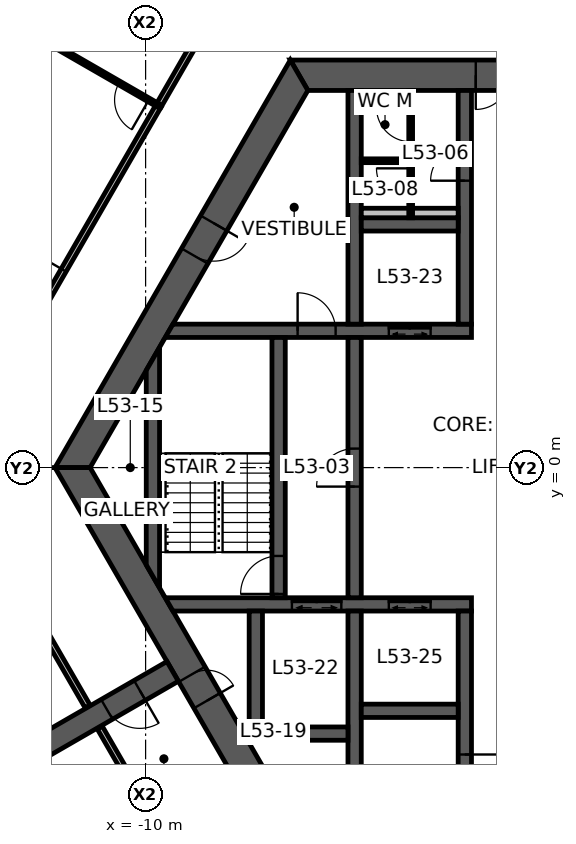
"""IFC4 building model, lengths in metres.
Left out: names, types, materials, properties, quantities, classifications, styles, units other than length and angle.
Written with IfcOpenShell. Run it as: python <this file> out.ifc"""

import sys

from ifc_helpers import new_model, si_unit, direction, frame, frame_2d, origin, place, context, subcontext, project, spatial, polyline, rectangle, outline, extrude, element, fill, save


model = new_model("IFC4")
c1 = context("Model", 3, precision=1e-05, world=origin(), true_north=direction((0.0, 1.0)))
c2 = subcontext(c1, "Body", "Model", "MODEL_VIEW")
j1 = project(units=[si_unit("LENGTHUNIT", "METRE"), si_unit("PLANEANGLEUNIT", "RADIAN")], contexts=[c1])
p1 = place(None, origin())
s1 = spatial("IfcSite", under=j1, at=p1, CompositionType="ELEMENT")
p2 = place(p1, origin())
s2 = spatial("IfcBuilding", under=s1, at=p2, CompositionType="ELEMENT")
p3 = place(p2, frame((0.0, 0.0, 212.8)))
s3 = spatial("IfcBuildingStorey", under=s2, at=p3, CompositionType="ELEMENT", Elevation=212.8)
p4 = place(p3, frame((5.961, 10.325, 0.0), z_axis=(0.0, 0.0, 1.0), x_axis=(-1.0, 0.0, 0.0)))
e1 = element("IfcWall", 1, at=p4, inside=s3, PredefinedType="SHEAR", context=c2, shape_type="SweptSolid", body=[
    extrude(outline(polyline([(-0.231, -0.4), (4.649, -0.4), (5.549, -0.4), (6.374, -0.4), (7.273, -0.4), (12.153, -0.4), (11.691, 0.4), (7.273, 0.4), (6.374, 0.4), (5.549, 0.4), (4.649, 0.4), (0.231, 0.4), (-0.231, -0.4)])), origin(), (0.0, 0.0, 1.0), 3.9),
])
p5 = place(p4, frame((6.374, 0.0, 0.0)))
e2 = element("IfcOpeningElement", 2, at=p5, cuts=e1, PredefinedType="OPENING", context=c2, shape_type="SweptSolid", body=[
    extrude(rectangle(XDim=0.9, YDim=2.1, at=frame_2d((0.45, 1.05))), frame((0.0, 0.41, 0.0), z_axis=(0.0, -1.0, 0.0), x_axis=(1.0, 0.0, 0.0)), (0.0, 0.0, 1.0), 0.82),
])
p6 = place(p4, frame((4.649, 0.0, 0.0)))
e3 = element("IfcOpeningElement", 3, at=p6, cuts=e1, PredefinedType="OPENING", context=c2, shape_type="SweptSolid", body=[
    extrude(rectangle(XDim=0.9, YDim=2.1, at=frame_2d((0.45, 1.05))), frame((0.0, 0.41, 0.0), z_axis=(0.0, -1.0, 0.0), x_axis=(1.0, 0.0, 0.0)), (0.0, 0.0, 1.0), 0.82),
])
p7 = place(p3, frame((-5.961, 10.325, 0.0), z_axis=(0.0, 0.0, 1.0), x_axis=(-0.500004296715, -0.866022923061, 0.0)))
e4 = element("IfcWall", 4, at=p7, inside=s3, PredefinedType="SHEAR", context=c2, shape_type="SweptSolid", body=[
    extrude(outline(polyline([(-0.231, -0.4), (4.494, -0.4), (5.494, -0.4), (12.153, -0.4), (11.691, 0.4), (5.494, 0.4), (4.494, 0.4), (0.231, 0.4), (-0.231, -0.4)])), origin(), (0.0, 0.0, 1.0), 3.9),
])
p8 = place(p7, frame((4.494, 0.0, 0.0)))
e5 = element("IfcOpeningElement", 5, at=p8, cuts=e4, PredefinedType="OPENING", context=c2, shape_type="SweptSolid", body=[
    extrude(rectangle(XDim=1.0, YDim=2.1, at=frame_2d((0.5, 1.05))), frame((0.0, 0.41, 0.0), z_axis=(0.0, -1.0, 0.0), x_axis=(1.0, 0.0, 0.0)), (0.0, 0.0, 1.0), 0.82),
])
p9 = place(p3, frame((-11.922, 0.0, 0.0), z_axis=(0.0, 0.0, 1.0), x_axis=(0.500004296715, -0.866022923061, 0.0)))
e6 = element("IfcWall", 6, at=p9, inside=s3, PredefinedType="SHEAR", context=c2, shape_type="SweptSolid", body=[
    extrude(outline(polyline([(-0.231, -0.4), (6.281, -0.4), (7.081, -0.4), (12.153, -0.4), (11.691, 0.4), (7.081, 0.4), (6.281, 0.4), (0.231, 0.4), (-0.231, -0.4)])), origin(), (0.0, 0.0, 1.0), 3.9),
])
p10 = place(p9, frame((6.281, 0.0, 0.0)))
e7 = element("IfcOpeningElement", 7, at=p10, cuts=e6, PredefinedType="OPENING", context=c2, shape_type="SweptSolid", body=[
    extrude(rectangle(XDim=0.8, YDim=2.1, at=frame_2d((0.4, 1.05))), frame((0.0, 0.41, 0.0), z_axis=(0.0, -1.0, 0.0), x_axis=(1.0, 0.0, 0.0)), (0.0, 0.0, 1.0), 0.82),
])
p11 = place(p3, frame((-9.288, -5.363, 0.0), z_axis=(0.0, 0.0, 1.0), x_axis=(-0.866027473358, -0.499996415376, 0.0)))
e8 = element("IfcWall", 8, at=p11, inside=s3, PredefinedType="SHEAR", context=c2, shape_type="SweptSolid", body=[
    extrude(rectangle(XDim=7.045, YDim=0.6, at=frame_2d((3.523, 0.0))), origin(), (0.0, 0.0, 1.0), 3.9),
])
p12 = place(p11, frame((1.0, 0.0, 0.0)))
e9 = element("IfcOpeningElement", 9, at=p12, cuts=e8, PredefinedType="OPENING", context=c2, shape_type="SweptSolid", body=[
    extrude(rectangle(XDim=1.0, YDim=2.1, at=frame_2d((0.5, 1.05))), frame((0.0, 0.31, 0.0), z_axis=(0.0, -1.0, 0.0), x_axis=(1.0, 0.0, 0.0)), (0.0, 0.0, 1.0), 0.62),
])
p13 = place(p3, frame((-9.382, 3.6, 0.0), z_axis=(0.0, 0.0, 1.0), x_axis=(1.0, 0.0, 0.0)))
e10 = element("IfcWall", 10, at=p13, inside=s3, PredefinedType="SHEAR", context=c2, shape_type="SweptSolid", body=[
    extrude(outline(polyline([(-0.101, -0.175), (3.382, -0.175), (4.382, -0.175), (5.782, -0.175), (6.882, -0.175), (7.957, -0.175), (7.957, 0.175), (6.882, 0.175), (5.782, 0.175), (4.382, 0.175), (3.382, 0.175), (0.101, 0.175), (-0.101, -0.175)])), origin(), (0.0, 0.0, 1.0), 3.9),
])
p14 = place(p13, frame((3.382, 0.0, 0.0)))
e11 = element("IfcOpeningElement", 11, at=p14, cuts=e10, PredefinedType="OPENING", context=c2, shape_type="SweptSolid", body=[
    extrude(rectangle(XDim=1.0, YDim=2.1, at=frame_2d((0.5, 1.05))), frame((0.0, 0.185, 0.0), z_axis=(0.0, -1.0, 0.0), x_axis=(1.0, 0.0, 0.0)), (0.0, 0.0, 1.0), 0.37),
])
p15 = place(p13, frame((5.782, 0.0, 0.0)))
e12 = element("IfcOpeningElement", 12, at=p15, cuts=e10, PredefinedType="OPENING", context=c2, shape_type="SweptSolid", body=[
    extrude(rectangle(XDim=1.1, YDim=2.1, at=frame_2d((0.55, 1.05))), frame((0.0, 0.185, 0.0), z_axis=(0.0, -1.0, 0.0), x_axis=(1.0, 0.0, 0.0)), (0.0, 0.0, 1.0), 0.37),
])
p16 = place(p3, frame((-9.382, -3.6, 0.0), z_axis=(0.0, 0.0, 1.0), x_axis=(1.0, 0.0, 0.0)))
e13 = element("IfcWall", 13, at=p16, inside=s3, PredefinedType="SHEAR", context=c2, shape_type="SweptSolid", body=[
    extrude(outline(polyline([(0.101, -0.175), (3.232, -0.175), (4.532, -0.175), (5.782, -0.175), (6.882, -0.175), (7.957, -0.175), (7.957, 0.175), (6.882, 0.175), (5.782, 0.175), (4.532, 0.175), (3.232, 0.175), (-0.101, 0.175), (0.101, -0.175)])), origin(), (0.0, 0.0, 1.0), 3.9),
])
p17 = place(p16, frame((5.782, 0.0, 0.0)))
e14 = element("IfcOpeningElement", 14, at=p17, cuts=e13, PredefinedType="OPENING", context=c2, shape_type="SweptSolid", body=[
    extrude(rectangle(XDim=1.1, YDim=2.1, at=frame_2d((0.55, 1.05))), frame((0.0, 0.185, 0.0), z_axis=(0.0, -1.0, 0.0), x_axis=(1.0, 0.0, 0.0)), (0.0, 0.0, 1.0), 0.37),
])
p18 = place(p16, frame((3.232, 0.0, 0.0)))
e15 = element("IfcOpeningElement", 15, at=p18, cuts=e13, PredefinedType="OPENING", context=c2, shape_type="SweptSolid", body=[
    extrude(rectangle(XDim=1.3, YDim=2.1, at=frame_2d((0.65, 1.05))), frame((0.0, 0.185, 0.0), z_axis=(0.0, -1.0, 0.0), x_axis=(1.0, 0.0, 0.0)), (0.0, 0.0, 1.0), 0.37),
])
p19 = place(p3, frame((-1.6, 3.775, 0.0), z_axis=(0.0, 0.0, 1.0), x_axis=(0.0, 1.0, 0.0)))
e16 = element("IfcWall", 16, at=p19, inside=s3, PredefinedType="SHEAR", context=c2, shape_type="SweptSolid", body=[
    extrude(rectangle(XDim=6.15, YDim=0.35, at=frame_2d((3.075, 0.0))), origin(), (0.0, 0.0, 1.0), 3.9),
])
p20 = place(p19, frame((3.775, 0.0, 0.0)))
e17 = element("IfcOpeningElement", 17, at=p20, cuts=e16, PredefinedType="OPENING", context=c2, shape_type="SweptSolid", body=[
    extrude(rectangle(XDim=0.9, YDim=2.1, at=frame_2d((0.45, 1.05))), frame((0.0, 0.185, 0.0), z_axis=(0.0, -1.0, 0.0), x_axis=(1.0, 0.0, 0.0)), (0.0, 0.0, 1.0), 0.37),
])
p21 = place(p3, frame((-1.6, -3.775, 0.0), z_axis=(0.0, 0.0, 1.0), x_axis=(0.0, -1.0, 0.0)))
e18 = element("IfcWall", 18, at=p21, inside=s3, PredefinedType="SHEAR", context=c2, shape_type="SweptSolid", body=[
    extrude(rectangle(XDim=6.15, YDim=0.35, at=frame_2d((3.075, 0.0))), origin(), (0.0, 0.0, 1.0), 3.9),
])
p22 = place(p21, frame((3.775, 0.0, 0.0)))
e19 = element("IfcOpeningElement", 19, at=p22, cuts=e18, PredefinedType="OPENING", context=c2, shape_type="SweptSolid", body=[
    extrude(rectangle(XDim=0.9, YDim=2.1, at=frame_2d((0.45, 1.05))), frame((0.0, 0.185, 0.0), z_axis=(0.0, -1.0, 0.0), x_axis=(1.0, 0.0, 0.0)), (0.0, 0.0, 1.0), 0.37),
])
p23 = place(p3, frame((-4.5, -3.425, 0.0), z_axis=(0.0, 0.0, 1.0), x_axis=(0.0, 1.0, 0.0)))
e20 = element("IfcWall", 20, at=p23, inside=s3, PredefinedType="SHEAR", context=c2, shape_type="SweptSolid", body=[
    extrude(rectangle(XDim=6.85, YDim=0.35, at=frame_2d((3.425, 0.0))), origin(), (0.0, 0.0, 1.0), 3.9),
])
p24 = place(p23, frame((2.925, 0.0, 0.0)))
e21 = element("IfcOpeningElement", 21, at=p24, cuts=e20, PredefinedType="OPENING", context=c2, shape_type="SweptSolid", body=[
    extrude(rectangle(XDim=1.0, YDim=2.1, at=frame_2d((0.5, 1.05))), frame((0.0, 0.185, 0.0), z_axis=(0.0, -1.0, 0.0), x_axis=(1.0, 0.0, 0.0)), (0.0, 0.0, 1.0), 0.37),
])
p25 = place(p3, frame((-6.5, -3.425, 0.0), z_axis=(0.0, 0.0, 1.0), x_axis=(0.0, 1.0, 0.0)))
e22 = element("IfcWall", 22, at=p25, inside=s3, PredefinedType="SHEAR", context=c2, shape_type="SweptSolid", body=[
    extrude(rectangle(XDim=6.85, YDim=0.35, at=frame_2d((3.425, 0.0))), origin(), (0.0, 0.0, 1.0), 3.9),
])
p26 = place(p25, frame((0.1, 0.0, 0.0)))
e23 = element("IfcOpeningElement", 23, at=p26, cuts=e22, PredefinedType="OPENING", context=c2, shape_type="SweptSolid", body=[
    extrude(rectangle(XDim=1.0, YDim=2.1, at=frame_2d((0.5, 1.05))), frame((0.0, 0.185, 0.0), z_axis=(0.0, -1.0, 0.0), x_axis=(1.0, 0.0, 0.0)), (0.0, 0.0, 1.0), 0.37),
])
for number, where, z_axis, x_axis in (
    (24, (-4.5, 3.775, 0.0), (0.0, 0.0, 1.0), (0.0, 1.0, 0.0)),
    (25, (-4.5, -3.775, 0.0), (0.0, 0.0, 1.0), (0.0, -1.0, 0.0)),
):
    element("IfcWall", number, at=place(p3, frame(where, z_axis=z_axis, x_axis=x_axis)), inside=s3, PredefinedType="SHEAR", context=c2, shape_type="SweptSolid", body=[
        extrude(rectangle(XDim=6.15, YDim=0.35, at=frame_2d((3.075, 0.0))), origin(), (0.0, 0.0, 1.0), 3.9),
    ])
for number, where, z_axis, x_axis in (
    (26, (-4.325, 6.4, 0.0), (0.0, 0.0, 1.0), (1.0, 0.0, 0.0)),
    (27, (-4.325, -6.4, 0.0), (0.0, 0.0, 1.0), (1.0, 0.0, 0.0)),
):
    element("IfcWall", number, at=place(p3, frame(where, z_axis=z_axis, x_axis=x_axis)), inside=s3, PredefinedType="SHEAR", context=c2, shape_type="SweptSolid", body=[
        extrude(rectangle(XDim=2.55, YDim=0.35, at=frame_2d((1.275, 0.0))), origin(), (0.0, 0.0, 1.0), 3.9),
    ])
p27 = place(p3, frame((-7.275, -7.0, 0.0), z_axis=(0.0, 0.0, 1.0), x_axis=(1.0, 0.0, 0.0)))
e28 = element("IfcWall", 28, at=p27, inside=s3, PredefinedType="SHEAR", context=c2, shape_type="SweptSolid", body=[
    extrude(rectangle(XDim=2.6, YDim=0.35, at=frame_2d((1.3, 0.0))), origin(), (0.0, 0.0, 1.0), 3.9),
])
p28 = place(p3, frame((-7.1, -3.775, 0.0), z_axis=(0.0, 0.0, 1.0), x_axis=(0.0, -1.0, 0.0)))
e29 = element("IfcWall", 29, at=p28, inside=s3, PredefinedType="SHEAR", context=c2, shape_type="SweptSolid", body=[
    extrude(rectangle(XDim=3.05, YDim=0.35, at=frame_2d((1.525, 0.0))), origin(), (0.0, 0.0, 1.0), 3.9),
])
p29 = place(p3, frame((-9.808, -2.862, 0.0), z_axis=(0.0, 0.0, 1.0), x_axis=(0.0, 1.0, 0.0)))
e30 = element("IfcWall", 30, at=p29, inside=s3, PredefinedType="SHEAR", context=c2, shape_type="SweptSolid", body=[
    extrude(outline(polyline([(-0.303, -0.175), (6.028, -0.175), (5.421, 0.175), (0.303, 0.175), (-0.303, -0.175)])), origin(), (0.0, 0.0, 1.0), 3.9),
])
p30 = place(p3, frame((-4.325, 6.7, 0.0), z_axis=(0.0, 0.0, 1.0), x_axis=(1.0, 0.0, 0.0)))
e31 = element("IfcWall", 31, at=p30, inside=s3, PredefinedType="PLUMBINGWALL", context=c2, shape_type="SweptSolid", body=[
    extrude(rectangle(XDim=2.55, YDim=0.25, at=frame_2d((1.275, 0.0))), origin(), (0.0, 0.0, 1.0), 3.9),
])
p31 = place(p3, frame((-3.025, 6.575, 0.0), z_axis=(0.0, 0.0, 1.0), x_axis=(0.0, 1.0, 0.0)))
e32 = element("IfcWall", 32, at=p31, inside=s3, PredefinedType="PARTITIONING", context=c2, shape_type="SweptSolid", body=[
    extrude(rectangle(XDim=3.35, YDim=0.1, at=frame_2d((1.675, 0.0))), origin(), (0.0, 0.0, 1.0), 2.95),
])
p32 = place(p31, frame((2.0, 0.0, 0.0)))
e33 = element("IfcOpeningElement", 33, at=p32, cuts=e32, PredefinedType="OPENING", context=c2, shape_type="SweptSolid", body=[
    extrude(rectangle(XDim=0.9, YDim=2.1, at=frame_2d((0.45, 1.05))), frame((0.0, 0.06, 0.0), z_axis=(0.0, -1.0, 0.0), x_axis=(1.0, 0.0, 0.0)), (0.0, 0.0, 1.0), 0.12),
])
p33 = place(p31, frame((0.4, 0.0, 0.0)))
e34 = element("IfcOpeningElement", 34, at=p33, cuts=e32, PredefinedType="OPENING", context=c2, shape_type="SweptSolid", body=[
    extrude(rectangle(XDim=0.9, YDim=2.1, at=frame_2d((0.45, 1.05))), frame((0.0, 0.06, 0.0), z_axis=(0.0, -1.0, 0.0), x_axis=(1.0, 0.0, 0.0)), (0.0, 0.0, 1.0), 0.12),
])
p34 = place(p3, frame((-3.075, 8.075, 0.0), z_axis=(0.0, 0.0, 1.0), x_axis=(-1.0, 0.0, 0.0)))
e35 = element("IfcWall", 35, at=p34, inside=s3, PredefinedType="PARTITIONING", context=c2, shape_type="SweptSolid", body=[
    extrude(rectangle(XDim=1.25, YDim=0.1, at=frame_2d((0.625, 0.0))), origin(), (0.0, 0.0, 1.0), 2.95),
])
p35 = place(p3, frame((-9.661, 9.516, 0.0), z_axis=(0.0, 0.0, 1.0), x_axis=(0.499997836828, 0.866026652689, 0.0)))
e36 = element("IfcWall", 36, at=p35, inside=s3, PredefinedType="PARTITIONING", context=c2, shape_type="SweptSolid", body=[
    extrude(rectangle(XDim=4.144, YDim=0.15, at=frame_2d((2.072, 0.0))), origin(), (0.0, 0.0, 1.0), 2.95),
])
p36 = place(p3, frame((-11.527, -6.285, 0.0), z_axis=(0.0, 0.0, 1.0), x_axis=(-0.500003537243, 0.866023361547, 0.0)))
e37 = element("IfcWall", 37, at=p36, inside=s3, PredefinedType="PARTITIONING", context=c2, shape_type="SweptSolid", body=[
    extrude(rectangle(XDim=6.516, YDim=0.15, at=frame_2d((3.258, 0.0))), origin(), (0.0, 0.0, 1.0), 2.95),
])
p37 = place(p3, frame((-15.156, 0.0, 0.0), z_axis=(0.0, 0.0, 1.0), x_axis=(0.500006847747, 0.8660214502, 0.0)))
e38 = element("IfcWall", 38, at=p37, inside=s3, PredefinedType="PARTITIONING", context=c2, shape_type="SweptSolid", body=[
    extrude(rectangle(XDim=10.998, YDim=0.15, at=frame_2d((5.499, 0.0))), origin(), (0.0, 0.0, 1.0), 2.95),
])
p38 = place(p37, frame((4.999, 0.0, 0.0)))
e39 = element("IfcOpeningElement", 39, at=p38, cuts=e38, PredefinedType="OPENING", context=c2, shape_type="SweptSolid", body=[
    extrude(rectangle(XDim=1.0, YDim=2.1, at=frame_2d((0.5, 1.05))), frame((0.0, 0.085, 0.0), z_axis=(0.0, -1.0, 0.0), x_axis=(1.0, 0.0, 0.0)), (0.0, 0.0, 1.0), 0.17),
])
p39 = place(p3, frame((-9.656, 9.524, 0.0), z_axis=(0.0, 0.0, 1.0), x_axis=(-0.866526579402, 0.499130931911, 0.0)))
e40 = element("IfcWall", 40, at=p39, inside=s3, PredefinedType="PARTITIONING", context=c2, shape_type="SweptSolid", body=[
    extrude(rectangle(XDim=4.705, YDim=0.1, at=frame_2d((2.353, 0.0))), origin(), (0.0, 0.0, 1.0), 2.95),
])
p40 = place(p39, frame((0.3, 0.0, 0.0)))
e41 = element("IfcOpeningElement", 41, at=p40, cuts=e40, PredefinedType="OPENING", context=c2, shape_type="SweptSolid", body=[
    extrude(rectangle(XDim=0.9, YDim=2.1, at=frame_2d((0.45, 1.05))), frame((0.0, 0.06, 0.0), z_axis=(0.0, -1.0, 0.0), x_axis=(1.0, 0.0, 0.0)), (0.0, 0.0, 1.0), 0.12),
])
p41 = place(p3, frame((-7.589, -13.105, 0.0), z_axis=(0.0, 0.0, 1.0), x_axis=(-0.499986333712, 0.866033293876, 0.0)))
e42 = element("IfcWall", 42, at=p41, inside=s3, PredefinedType="PARTITIONING", context=c2, shape_type="SweptSolid", body=[
    extrude(rectangle(XDim=7.235, YDim=0.15, at=frame_2d((3.617, 0.0))), origin(), (0.0, 0.0, 1.0), 2.95),
])
p42 = place(p41, frame((3.117, 0.0, 0.0)))
e43 = element("IfcOpeningElement", 43, at=p42, cuts=e42, PredefinedType="OPENING", context=c2, shape_type="SweptSolid", body=[
    extrude(rectangle(XDim=1.0, YDim=2.1, at=frame_2d((0.5, 1.05))), frame((0.0, 0.085, 0.0), z_axis=(0.0, -1.0, 0.0), x_axis=(1.0, 0.0, 0.0)), (0.0, 0.0, 1.0), 0.17),
])
p43 = place(p5, origin())
e44 = element("IfcDoor", 44, at=p43, inside=s3, OperationType="SINGLE_SWING_RIGHT", PredefinedType="DOOR", context=c2, shape_type="SweptSolid", body=[
    extrude(rectangle(XDim=0.9, YDim=2.1, at=frame_2d((0.45, 1.05))), frame((0.0, 0.025, 0.0), z_axis=(0.0, -1.0, 0.0), x_axis=(1.0, 0.0, 0.0)), (0.0, 0.0, 1.0), 0.05),
])
fill(e2, e44)
p44 = place(p10, origin())
e45 = element("IfcDoor", 45, at=p44, inside=s3, OperationType="SINGLE_SWING_RIGHT", PredefinedType="DOOR", context=c2, shape_type="SweptSolid", body=[
    extrude(rectangle(XDim=0.8, YDim=2.1, at=frame_2d((0.4, 1.05))), frame((0.0, 0.025, 0.0), z_axis=(0.0, -1.0, 0.0), x_axis=(1.0, 0.0, 0.0)), (0.0, 0.0, 1.0), 0.05),
])
fill(e7, e45)
p45 = place(p8, origin())
e46 = element("IfcDoor", 46, at=p45, inside=s3, OperationType="SINGLE_SWING_LEFT", PredefinedType="DOOR", context=c2, shape_type="SweptSolid", body=[
    extrude(rectangle(XDim=1.0, YDim=2.1, at=frame_2d((0.5, 1.05))), frame((0.0, 0.025, 0.0), z_axis=(0.0, -1.0, 0.0), x_axis=(1.0, 0.0, 0.0)), (0.0, 0.0, 1.0), 0.05),
])
fill(e5, e46)
p46 = place(p24, origin())
e47 = element("IfcDoor", 47, at=p46, inside=s3, OperationType="SINGLE_SWING_LEFT", PredefinedType="DOOR", context=c2, shape_type="SweptSolid", body=[
    extrude(rectangle(XDim=1.0, YDim=2.1, at=frame_2d((0.5, 1.05))), frame((0.0, 0.025, 0.0), z_axis=(0.0, -1.0, 0.0), x_axis=(1.0, 0.0, 0.0)), (0.0, 0.0, 1.0), 0.05),
])
fill(e21, e47)
p47 = place(p26, origin())
e48 = element("IfcDoor", 48, at=p47, inside=s3, OperationType="SINGLE_SWING_LEFT", PredefinedType="DOOR", context=c2, shape_type="SweptSolid", body=[
    extrude(rectangle(XDim=1.0, YDim=2.1, at=frame_2d((0.5, 1.05))), frame((0.0, 0.025, 0.0), z_axis=(0.0, -1.0, 0.0), x_axis=(1.0, 0.0, 0.0)), (0.0, 0.0, 1.0), 0.05),
])
fill(e23, e48)
p48 = place(p14, origin())
e49 = element("IfcDoor", 49, at=p48, inside=s3, OperationType="SINGLE_SWING_LEFT", PredefinedType="DOOR", context=c2, shape_type="SweptSolid", body=[
    extrude(rectangle(XDim=1.0, YDim=2.1, at=frame_2d((0.5, 1.05))), frame((0.0, 0.025, 0.0), z_axis=(0.0, -1.0, 0.0), x_axis=(1.0, 0.0, 0.0)), (0.0, 0.0, 1.0), 0.05),
])
fill(e11, e49)
p49 = place(p20, origin())
e50 = element("IfcDoor", 50, at=p49, inside=s3, OperationType="SINGLE_SWING_LEFT", PredefinedType="DOOR", context=c2, shape_type="SweptSolid", body=[
    extrude(rectangle(XDim=0.9, YDim=2.1, at=frame_2d((0.45, 1.05))), frame((0.0, 0.025, 0.0), z_axis=(0.0, -1.0, 0.0), x_axis=(1.0, 0.0, 0.0)), (0.0, 0.0, 1.0), 0.05),
])
fill(e17, e50)
p50 = place(p22, origin())
e51 = element("IfcDoor", 51, at=p50, inside=s3, OperationType="SINGLE_SWING_LEFT", PredefinedType="DOOR", context=c2, shape_type="SweptSolid", body=[
    extrude(rectangle(XDim=0.9, YDim=2.1, at=frame_2d((0.45, 1.05))), frame((0.0, 0.025, 0.0), z_axis=(0.0, -1.0, 0.0), x_axis=(1.0, 0.0, 0.0)), (0.0, 0.0, 1.0), 0.05),
])
fill(e19, e51)
p51 = place(p12, origin())
e52 = element("IfcDoor", 52, at=p51, inside=s3, OperationType="SINGLE_SWING_LEFT", PredefinedType="DOOR", context=c2, shape_type="SweptSolid", body=[
    extrude(rectangle(XDim=1.0, YDim=2.1, at=frame_2d((0.5, 1.05))), frame((0.0, 0.025, 0.0), z_axis=(0.0, -1.0, 0.0), x_axis=(1.0, 0.0, 0.0)), (0.0, 0.0, 1.0), 0.05),
])
fill(e9, e52)
p52 = place(p32, origin())
e53 = element("IfcDoor", 53, at=p52, inside=s3, OperationType="SINGLE_SWING_RIGHT", PredefinedType="DOOR", context=c2, shape_type="SweptSolid", body=[
    extrude(rectangle(XDim=0.9, YDim=2.1, at=frame_2d((0.45, 1.05))), frame((0.0, 0.025, 0.0), z_axis=(0.0, -1.0, 0.0), x_axis=(1.0, 0.0, 0.0)), (0.0, 0.0, 1.0), 0.05),
])
fill(e33, e53)
p53 = place(p33, origin())
e54 = element("IfcDoor", 54, at=p53, inside=s3, OperationType="SINGLE_SWING_RIGHT", PredefinedType="DOOR", context=c2, shape_type="SweptSolid", body=[
    extrude(rectangle(XDim=0.9, YDim=2.1, at=frame_2d((0.45, 1.05))), frame((0.0, 0.025, 0.0), z_axis=(0.0, -1.0, 0.0), x_axis=(1.0, 0.0, 0.0)), (0.0, 0.0, 1.0), 0.05),
])
fill(e34, e54)
p54 = place(p38, origin())
e55 = element("IfcDoor", 55, at=p54, inside=s3, OperationType="SINGLE_SWING_RIGHT", PredefinedType="DOOR", context=c2, shape_type="SweptSolid", body=[
    extrude(rectangle(XDim=1.0, YDim=2.1, at=frame_2d((0.5, 1.05))), frame((0.0, 0.025, 0.0), z_axis=(0.0, -1.0, 0.0), x_axis=(1.0, 0.0, 0.0)), (0.0, 0.0, 1.0), 0.05),
])
fill(e39, e55)
p55 = place(p40, origin())
e56 = element("IfcDoor", 56, at=p55, inside=s3, OperationType="SINGLE_SWING_LEFT", PredefinedType="DOOR", context=c2, shape_type="SweptSolid", body=[
    extrude(rectangle(XDim=0.9, YDim=2.1, at=frame_2d((0.45, 1.05))), frame((0.0, 0.025, 0.0), z_axis=(0.0, -1.0, 0.0), x_axis=(1.0, 0.0, 0.0)), (0.0, 0.0, 1.0), 0.05),
])
fill(e41, e56)
p56 = place(p15, origin())
e57 = element("IfcDoor", 57, at=p56, inside=s3, OperationType="DOUBLE_DOOR_SLIDING", PredefinedType="DOOR", context=c2, shape_type="SweptSolid", body=[
    extrude(rectangle(XDim=1.1, YDim=2.1, at=frame_2d((0.55, 1.05))), frame((0.0, 0.025, 0.0), z_axis=(0.0, -1.0, 0.0), x_axis=(1.0, 0.0, 0.0)), (0.0, 0.0, 1.0), 0.05),
])
fill(e12, e57)
p57 = place(p17, origin())
e58 = element("IfcDoor", 58, at=p57, inside=s3, OperationType="DOUBLE_DOOR_SLIDING", PredefinedType="DOOR", context=c2, shape_type="SweptSolid", body=[
    extrude(rectangle(XDim=1.1, YDim=2.1, at=frame_2d((0.55, 1.05))), frame((0.0, 0.025, 0.0), z_axis=(0.0, -1.0, 0.0), x_axis=(1.0, 0.0, 0.0)), (0.0, 0.0, 1.0), 0.05),
])
fill(e14, e58)
p58 = place(p18, origin())
e59 = element("IfcDoor", 59, at=p58, inside=s3, OperationType="DOUBLE_DOOR_SLIDING", PredefinedType="DOOR", context=c2, shape_type="SweptSolid", body=[
    extrude(rectangle(XDim=1.3, YDim=2.1, at=frame_2d((0.65, 1.05))), frame((0.0, 0.025, 0.0), z_axis=(0.0, -1.0, 0.0), x_axis=(1.0, 0.0, 0.0)), (0.0, 0.0, 1.0), 0.05),
])
fill(e15, e59)
save(model, sys.argv[1])
